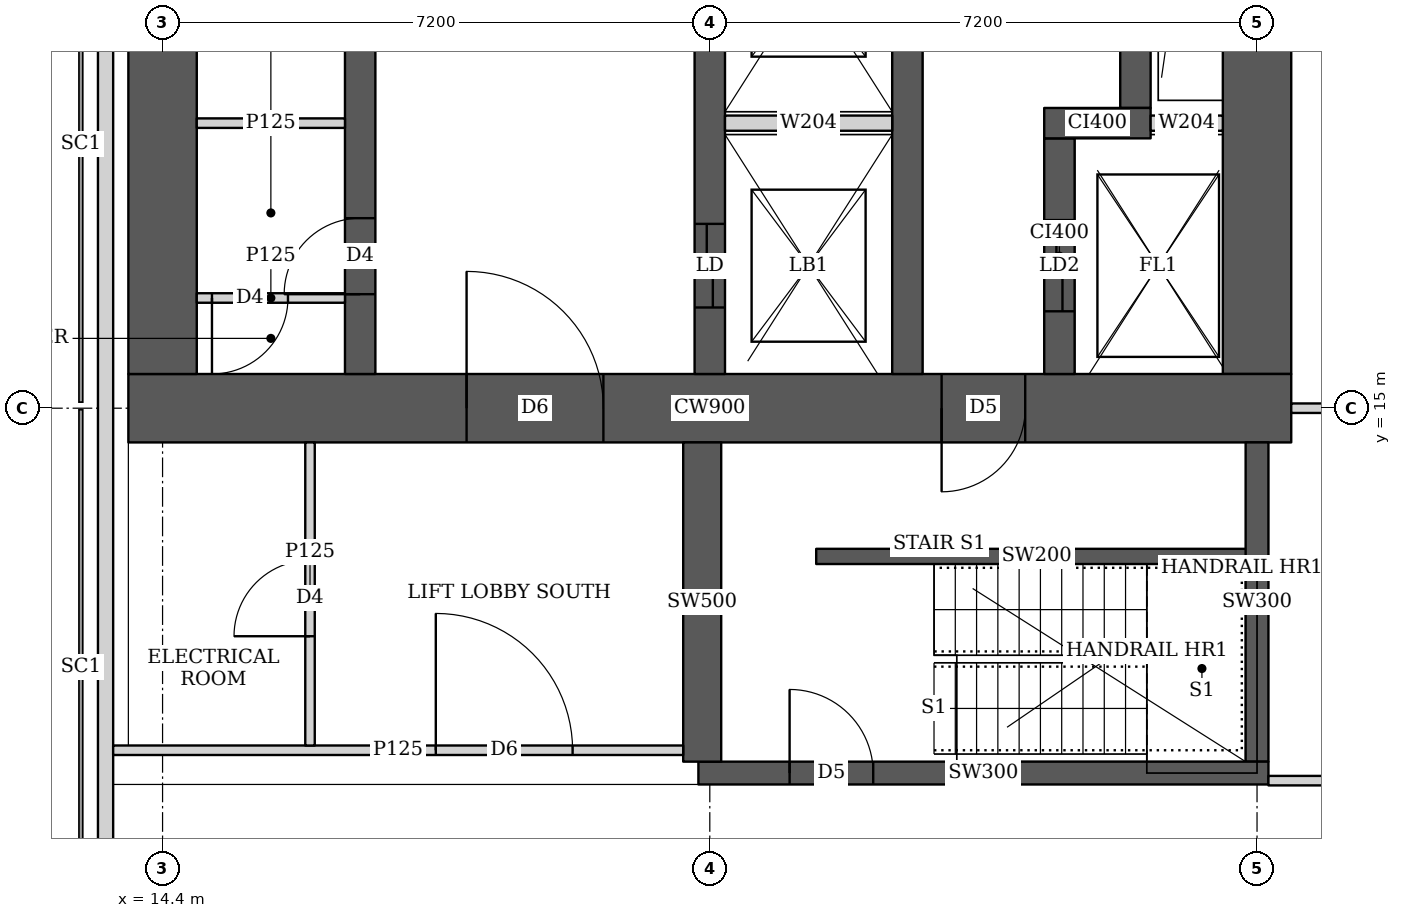
"""IFC4 building model, lengths in metres.
Left out: names, types, materials, properties, quantities, classifications, styles, units other than length and angle.
Written with IfcOpenShell. Run it as: python <this file> out.ifc"""

import sys

from ifc_helpers import new_model, si_unit, direction, frame, frame_2d, origin, place, context, subcontext, project, spatial, rectangle, extrude, element, fill, save


model = new_model("IFC4")
c1 = context("Model", 3, precision=1e-05, world=origin(), true_north=direction((0.0, 1.0)))
c2 = subcontext(c1, "Body", "Model", "MODEL_VIEW")
j1 = project(units=[si_unit("LENGTHUNIT", "METRE"), si_unit("PLANEANGLEUNIT", "RADIAN")], contexts=[c1])
p1 = place(None, origin())
s1 = spatial("IfcSite", under=j1, at=p1, CompositionType="ELEMENT")
p2 = place(p1, origin())
s2 = spatial("IfcBuilding", under=s1, at=p2, CompositionType="ELEMENT")
p3 = place(p2, frame((0.0, 0.0, 266.6)))
s3 = spatial("IfcBuildingStorey", under=s2, at=p3, CompositionType="ELEMENT", Elevation=266.6)
p4 = place(p3, frame((13.95, 15.0, 0.0), z_axis=(0.0, 0.0, 1.0), x_axis=(1.0, 0.0, 0.0)))
e1 = element("IfcWall", 1, at=p4, inside=s3, PredefinedType="SHEAR", context=c2, shape_type="SweptSolid", body=[
    extrude(rectangle(XDim=15.3, YDim=0.9, at=frame_2d((7.65, 0.0))), origin(), (0.0, 0.0, 1.0), 3.75),
])
p5 = place(p4, frame((4.45, 0.0, 0.0)))
e2 = element("IfcOpeningElement", 2, at=p5, cuts=e1, PredefinedType="OPENING", context=c2, shape_type="SweptSolid", body=[
    extrude(rectangle(XDim=1.8, YDim=2.1, at=frame_2d((0.9, 1.05))), frame((0.0, 0.46, 0.0), z_axis=(0.0, -1.0, 0.0), x_axis=(1.0, 0.0, 0.0)), (0.0, 0.0, 1.0), 0.92),
])
p6 = place(p4, frame((10.7, 0.0, 0.0)))
e3 = element("IfcOpeningElement", 3, at=p6, cuts=e1, PredefinedType="OPENING", context=c2, shape_type="SweptSolid", body=[
    extrude(rectangle(XDim=1.1, YDim=2.1, at=frame_2d((0.55, 1.05))), frame((0.0, 0.46, 0.0), z_axis=(0.0, -1.0, 0.0), x_axis=(1.0, 0.0, 0.0)), (0.0, 0.0, 1.0), 0.92),
])
for number, where, z_axis, x_axis in (
    (4, (14.4, 15.45, 0.0), (0.0, 0.0, 1.0), (0.0, 1.0, 0.0)),
    (5, (28.8, 15.45, 0.0), (0.0, 0.0, 1.0), (0.0, 1.0, 0.0)),
):
    element("IfcWall", number, at=place(p3, frame(where, z_axis=z_axis, x_axis=x_axis)), inside=s3, PredefinedType="SHEAR", context=c2, shape_type="SweptSolid", body=[
        extrude(rectangle(XDim=14.1, YDim=0.9, at=frame_2d((7.05, 0.0))), origin(), (0.0, 0.0, 1.0), 3.75),
    ])
p7 = place(p3, frame((17.0, 15.45, 0.0), z_axis=(0.0, 0.0, 1.0), x_axis=(0.0, 1.0, 0.0)))
e6 = element("IfcWall", 6, at=p7, inside=s3, PredefinedType="SHEAR", context=c2, shape_type="SweptSolid", body=[
    extrude(rectangle(XDim=14.1, YDim=0.4, at=frame_2d((7.05, 0.0))), origin(), (0.0, 0.0, 1.0), 3.75),
])
p8 = place(p7, frame((1.05, 0.0, 0.0)))
e7 = element("IfcOpeningElement", 7, at=p8, cuts=e6, PredefinedType="OPENING", context=c2, shape_type="SweptSolid", body=[
    extrude(rectangle(XDim=1.0, YDim=2.1, at=frame_2d((0.5, 1.05))), frame((0.0, 0.21, 0.0), z_axis=(0.0, -1.0, 0.0), x_axis=(1.0, 0.0, 0.0)), (0.0, 0.0, 1.0), 0.42),
])
p9 = place(p7, frame((4.675, 0.0, 0.0)))
e8 = element("IfcOpeningElement", 8, at=p9, cuts=e6, PredefinedType="OPENING", context=c2, shape_type="SweptSolid", body=[
    extrude(rectangle(XDim=1.0, YDim=2.1, at=frame_2d((0.5, 1.05))), frame((0.0, 0.21, 0.0), z_axis=(0.0, -1.0, 0.0), x_axis=(1.0, 0.0, 0.0)), (0.0, 0.0, 1.0), 0.42),
])
p10 = place(p7, frame((8.425, 0.0, 0.0)))
e9 = element("IfcOpeningElement", 9, at=p10, cuts=e6, PredefinedType="OPENING", context=c2, shape_type="SweptSolid", body=[
    extrude(rectangle(XDim=1.0, YDim=2.1, at=frame_2d((0.5, 1.05))), frame((0.0, 0.21, 0.0), z_axis=(0.0, -1.0, 0.0), x_axis=(1.0, 0.0, 0.0)), (0.0, 0.0, 1.0), 0.42),
])
p11 = place(p7, frame((12.175, 0.0, 0.0)))
e10 = element("IfcOpeningElement", 10, at=p11, cuts=e6, PredefinedType="OPENING", context=c2, shape_type="SweptSolid", body=[
    extrude(rectangle(XDim=1.0, YDim=2.1, at=frame_2d((0.5, 1.05))), frame((0.0, 0.21, 0.0), z_axis=(0.0, -1.0, 0.0), x_axis=(1.0, 0.0, 0.0)), (0.0, 0.0, 1.0), 0.42),
])
p12 = place(p3, frame((21.6, 15.45, 0.0), z_axis=(0.0, 0.0, 1.0), x_axis=(0.0, 1.0, 0.0)))
e11 = element("IfcWall", 11, at=p12, inside=s3, PredefinedType="SHEAR", context=c2, shape_type="SweptSolid", body=[
    extrude(rectangle(XDim=14.1, YDim=0.4, at=frame_2d((7.05, 0.0))), origin(), (0.0, 0.0, 1.0), 3.75),
])
p13 = place(p12, frame((0.875, 0.0, 0.0)))
e12 = element("IfcOpeningElement", 12, at=p13, cuts=e11, PredefinedType="OPENING", context=c2, shape_type="SweptSolid", body=[
    extrude(rectangle(XDim=1.1, YDim=2.1, at=frame_2d((0.55, 1.05))), frame((0.0, 0.21, 0.0), z_axis=(0.0, -1.0, 0.0), x_axis=(1.0, 0.0, 0.0)), (0.0, 0.0, 1.0), 0.42),
])
p14 = place(p12, frame((4.625, 0.0, 0.0)))
e13 = element("IfcOpeningElement", 13, at=p14, cuts=e11, PredefinedType="OPENING", context=c2, shape_type="SweptSolid", body=[
    extrude(rectangle(XDim=1.1, YDim=2.1, at=frame_2d((0.55, 1.05))), frame((0.0, 0.21, 0.0), z_axis=(0.0, -1.0, 0.0), x_axis=(1.0, 0.0, 0.0)), (0.0, 0.0, 1.0), 0.42),
])
p15 = place(p12, frame((8.375, 0.0, 0.0)))
e14 = element("IfcOpeningElement", 14, at=p15, cuts=e11, PredefinedType="OPENING", context=c2, shape_type="SweptSolid", body=[
    extrude(rectangle(XDim=1.1, YDim=2.1, at=frame_2d((0.55, 1.05))), frame((0.0, 0.21, 0.0), z_axis=(0.0, -1.0, 0.0), x_axis=(1.0, 0.0, 0.0)), (0.0, 0.0, 1.0), 0.42),
])
p16 = place(p12, frame((12.125, 0.0, 0.0)))
e15 = element("IfcOpeningElement", 15, at=p16, cuts=e11, PredefinedType="OPENING", context=c2, shape_type="SweptSolid", body=[
    extrude(rectangle(XDim=1.1, YDim=2.1, at=frame_2d((0.55, 1.05))), frame((0.0, 0.21, 0.0), z_axis=(0.0, -1.0, 0.0), x_axis=(1.0, 0.0, 0.0)), (0.0, 0.0, 1.0), 0.42),
])
p17 = place(p3, frame((24.2, 15.45, 0.0), z_axis=(0.0, 0.0, 1.0), x_axis=(0.0, 1.0, 0.0)))
e16 = element("IfcWall", 16, at=p17, inside=s3, PredefinedType="SHEAR", context=c2, shape_type="SweptSolid", body=[
    extrude(rectangle(XDim=14.1, YDim=0.4, at=frame_2d((7.05, 0.0))), origin(), (0.0, 0.0, 1.0), 3.75),
])
p18 = place(p3, frame((26.2, 15.45, 0.0), z_axis=(0.0, 0.0, 1.0), x_axis=(0.0, 1.0, 0.0)))
e17 = element("IfcWall", 17, at=p18, inside=s3, PredefinedType="SHEAR", context=c2, shape_type="SweptSolid", body=[
    extrude(rectangle(XDim=3.1, YDim=0.4, at=frame_2d((1.55, 0.0))), origin(), (0.0, 0.0, 1.0), 3.75),
])
p19 = place(p18, frame((0.825, 0.0, 0.0)))
e18 = element("IfcOpeningElement", 18, at=p19, cuts=e17, PredefinedType="OPENING", context=c2, shape_type="SweptSolid", body=[
    extrude(rectangle(XDim=1.2, YDim=2.1, at=frame_2d((0.6, 1.05))), frame((0.0, 0.21, 0.0), z_axis=(0.0, -1.0, 0.0), x_axis=(1.0, 0.0, 0.0)), (0.0, 0.0, 1.0), 0.42),
])
p20 = place(p3, frame((26.0, 18.75, 0.0), z_axis=(0.0, 0.0, 1.0), x_axis=(1.0, 0.0, 0.0)))
e19 = element("IfcWall", 19, at=p20, inside=s3, PredefinedType="SHEAR", context=c2, shape_type="SweptSolid", body=[
    extrude(rectangle(XDim=1.4, YDim=0.4, at=frame_2d((0.7, 0.0))), origin(), (0.0, 0.0, 1.0), 3.75),
])
p21 = place(p3, frame((27.2, 18.95, 0.0), z_axis=(0.0, 0.0, 1.0), x_axis=(0.0, 1.0, 0.0)))
e20 = element("IfcWall", 20, at=p21, inside=s3, PredefinedType="SHEAR", context=c2, shape_type="SweptSolid", body=[
    extrude(rectangle(XDim=7.1, YDim=0.4, at=frame_2d((3.55, 0.0))), origin(), (0.0, 0.0, 1.0), 3.75),
])
p22 = place(p3, frame((21.45, 10.2, 0.0), z_axis=(0.0, 0.0, 1.0), x_axis=(1.0, 0.0, 0.0)))
e21 = element("IfcWall", 21, at=p22, inside=s3, PredefinedType="SHEAR", context=c2, shape_type="SweptSolid", body=[
    extrude(rectangle(XDim=7.5, YDim=0.3, at=frame_2d((3.75, 0.0))), origin(), (0.0, 0.0, 1.0), 3.75),
])
p23 = place(p22, frame((1.2, 0.0, 0.0)))
e22 = element("IfcOpeningElement", 22, at=p23, cuts=e21, PredefinedType="OPENING", context=c2, shape_type="SweptSolid", body=[
    extrude(rectangle(XDim=1.1, YDim=2.1, at=frame_2d((0.55, 1.05))), frame((0.0, 0.16, 0.0), z_axis=(0.0, -1.0, 0.0), x_axis=(1.0, 0.0, 0.0)), (0.0, 0.0, 1.0), 0.32),
])
p24 = place(p3, frame((21.5, 10.35, 0.0), z_axis=(0.0, 0.0, 1.0), x_axis=(0.0, 1.0, 0.0)))
e23 = element("IfcWall", 23, at=p24, inside=s3, PredefinedType="SHEAR", context=c2, shape_type="SweptSolid", body=[
    extrude(rectangle(XDim=4.2, YDim=0.5, at=frame_2d((2.1, 0.0))), origin(), (0.0, 0.0, 1.0), 3.75),
])
p25 = place(p3, frame((28.8, 10.35, 0.0), z_axis=(0.0, 0.0, 1.0), x_axis=(0.0, 1.0, 0.0)))
e24 = element("IfcWall", 24, at=p25, inside=s3, PredefinedType="SHEAR", context=c2, shape_type="SweptSolid", body=[
    extrude(rectangle(XDim=4.2, YDim=0.3, at=frame_2d((2.1, 0.0))), origin(), (0.0, 0.0, 1.0), 3.75),
])
p26 = place(p3, frame((13.65, 43.037, 0.0), z_axis=(0.0, 0.0, 1.0), x_axis=(0.0, -1.0, 0.0)))
e25 = element("IfcWall", 25, at=p26, inside=s3, PredefinedType="SOLIDWALL", context=c2, shape_type="SweptSolid", body=[
    extrude(rectangle(XDim=35.374, YDim=0.2, at=frame_2d((17.687, 0.0))), origin(), (0.0, 0.0, 1.0), 3.5),
])
p27 = place(p26, frame((1.959, 0.0, 0.9)))
e26 = element("IfcOpeningElement", 26, at=p27, cuts=e25, PredefinedType="OPENING", context=c2, shape_type="SweptSolid", body=[
    extrude(rectangle(XDim=1.8, YDim=1.5, at=frame_2d((0.9, 0.75))), frame((0.0, 0.11, 0.0), z_axis=(0.0, -1.0, 0.0), x_axis=(1.0, 0.0, 0.0)), (0.0, 0.0, 1.0), 0.22),
])
p28 = place(p3, frame((13.75, 10.5, 0.0), z_axis=(0.0, 0.0, 1.0), x_axis=(1.0, 0.0, 0.0)))
e27 = element("IfcWall", 27, at=p28, inside=s3, PredefinedType="PARTITIONING", context=c2, shape_type="SweptSolid", body=[
    extrude(rectangle(XDim=7.5, YDim=0.125, at=frame_2d((3.75, 0.0))), origin(), (0.0, 0.0, 1.0), 3.5),
])
p29 = place(p28, frame((4.245, 0.0, 0.0)))
e28 = element("IfcOpeningElement", 28, at=p29, cuts=e27, PredefinedType="OPENING", context=c2, shape_type="SweptSolid", body=[
    extrude(rectangle(XDim=1.8, YDim=2.1, at=frame_2d((0.9, 1.05))), frame((0.0, 0.073, 0.0), z_axis=(0.0, -1.0, 0.0), x_axis=(1.0, 0.0, 0.0)), (0.0, 0.0, 1.0), 0.145),
])
p30 = place(p3, frame((16.34, 10.562, 0.0), z_axis=(0.0, 0.0, 1.0), x_axis=(0.0, 1.0, 0.0)))
e29 = element("IfcWall", 29, at=p30, inside=s3, PredefinedType="PARTITIONING", context=c2, shape_type="SweptSolid", body=[
    extrude(rectangle(XDim=3.988, YDim=0.125, at=frame_2d((1.994, 0.0))), origin(), (0.0, 0.0, 1.0), 3.5),
])
p31 = place(p30, frame((1.438, 0.0, 0.0)))
e30 = element("IfcOpeningElement", 30, at=p31, cuts=e29, PredefinedType="OPENING", context=c2, shape_type="SweptSolid", body=[
    extrude(rectangle(XDim=1.0, YDim=2.1, at=frame_2d((0.5, 1.05))), frame((0.0, 0.073, 0.0), z_axis=(0.0, -1.0, 0.0), x_axis=(1.0, 0.0, 0.0)), (0.0, 0.0, 1.0), 0.145),
])
p32 = place(p3, frame((28.95, 10.1, 0.0), z_axis=(0.0, 0.0, 1.0), x_axis=(1.0, 0.0, 0.0)))
e31 = element("IfcWall", 31, at=p32, inside=s3, PredefinedType="PARTITIONING", context=c2, shape_type="SweptSolid", body=[
    extrude(rectangle(XDim=9.188, YDim=0.125, at=frame_2d((4.594, 0.0))), origin(), (0.0, 0.0, 1.0), 3.5),
])
p33 = place(p3, frame((29.25, 15.0, 0.0), z_axis=(0.0, 0.0, 1.0), x_axis=(1.0, 0.0, 0.0)))
e32 = element("IfcWall", 32, at=p33, inside=s3, PredefinedType="PARTITIONING", context=c2, shape_type="SweptSolid", body=[
    extrude(rectangle(XDim=6.049, YDim=0.125, at=frame_2d((3.024, 0.0))), origin(), (0.0, 0.0, 1.0), 3.5),
])
p34 = place(p3, frame((14.85, 16.45, 0.0), z_axis=(0.0, 0.0, 1.0), x_axis=(1.0, 0.0, 0.0)))
e33 = element("IfcWall", 33, at=p34, inside=s3, PredefinedType="PARTITIONING", context=c2, shape_type="SweptSolid", body=[
    extrude(rectangle(XDim=1.95, YDim=0.125, at=frame_2d((0.975, 0.0))), origin(), (0.0, 0.0, 1.0), 3.5),
])
p35 = place(p34, frame((0.2, 0.0, 0.0)))
e34 = element("IfcOpeningElement", 34, at=p35, cuts=e33, PredefinedType="OPENING", context=c2, shape_type="SweptSolid", body=[
    extrude(rectangle(XDim=1.0, YDim=2.1, at=frame_2d((0.5, 1.05))), frame((0.0, 0.073, 0.0), z_axis=(0.0, -1.0, 0.0), x_axis=(1.0, 0.0, 0.0)), (0.0, 0.0, 1.0), 0.145),
])
p36 = place(p3, frame((14.85, 18.75, 0.0), z_axis=(0.0, 0.0, 1.0), x_axis=(1.0, 0.0, 0.0)))
e35 = element("IfcWall", 35, at=p36, inside=s3, PredefinedType="PARTITIONING", context=c2, shape_type="SweptSolid", body=[
    extrude(rectangle(XDim=1.95, YDim=0.125, at=frame_2d((0.975, 0.0))), origin(), (0.0, 0.0, 1.0), 3.5),
])
p37 = place(p3, frame((23.0, 13.05, 0.0), z_axis=(0.0, 0.0, 1.0), x_axis=(1.0, 0.0, 0.0)))
e36 = element("IfcWall", 36, at=p37, inside=s3, PredefinedType="SHEAR", context=c2, shape_type="SweptSolid", body=[
    extrude(rectangle(XDim=5.8, YDim=0.2, at=frame_2d((2.9, 0.0))), origin(), (0.0, 0.0, 1.0), 3.75),
])
p38 = place(p3, frame((21.8, 18.75, 0.0), z_axis=(0.0, 0.0, 1.0), x_axis=(1.0, 0.0, 0.0)))
e37 = element("IfcWall", 37, at=p38, inside=s3, PredefinedType="SOLIDWALL", context=c2, shape_type="SweptSolid", body=[
    extrude(rectangle(XDim=2.2, YDim=0.2, at=frame_2d((1.1, 0.0))), origin(), (0.0, 0.0, 1.0), 3.5),
])
p39 = place(p3, frame((27.4, 18.75, 0.0), z_axis=(0.0, 0.0, 1.0), x_axis=(1.0, 0.0, 0.0)))
e38 = element("IfcWall", 38, at=p39, inside=s3, PredefinedType="SOLIDWALL", context=c2, shape_type="SweptSolid", body=[
    extrude(rectangle(XDim=0.95, YDim=0.2, at=frame_2d((0.475, 0.0))), origin(), (0.0, 0.0, 1.0), 3.5),
])
p40 = place(p31, origin())
e39 = element("IfcDoor", 39, at=p40, inside=s3, OperationType="SINGLE_SWING_LEFT", PredefinedType="DOOR", context=c2, shape_type="SweptSolid", body=[
    extrude(rectangle(XDim=1.0, YDim=2.1, at=frame_2d((0.5, 1.05))), frame((0.0, 0.025, 0.0), z_axis=(0.0, -1.0, 0.0), x_axis=(1.0, 0.0, 0.0)), (0.0, 0.0, 1.0), 0.05),
])
fill(e30, e39)
p41 = place(p29, origin())
e40 = element("IfcDoor", 40, at=p41, inside=s3, OperationType="DOUBLE_DOOR_SINGLE_SWING", PredefinedType="DOOR", context=c2, shape_type="SweptSolid", body=[
    extrude(rectangle(XDim=1.8, YDim=2.1, at=frame_2d((0.9, 1.05))), frame((0.0, 0.025, 0.0), z_axis=(0.0, -1.0, 0.0), x_axis=(1.0, 0.0, 0.0)), (0.0, 0.0, 1.0), 0.05),
])
fill(e28, e40)
p42 = place(p35, origin())
e41 = element("IfcDoor", 41, at=p42, inside=s3, OperationType="SINGLE_SWING_RIGHT", PredefinedType="DOOR", context=c2, shape_type="SweptSolid", body=[
    extrude(rectangle(XDim=1.0, YDim=2.1, at=frame_2d((0.5, 1.05))), frame((0.0, 0.025, 0.0), z_axis=(0.0, -1.0, 0.0), x_axis=(1.0, 0.0, 0.0)), (0.0, 0.0, 1.0), 0.05),
])
fill(e34, e41)
p43 = place(p8, origin())
e42 = element("IfcDoor", 42, at=p43, inside=s3, OperationType="SINGLE_SWING_LEFT", PredefinedType="DOOR", context=c2, shape_type="SweptSolid", body=[
    extrude(rectangle(XDim=1.0, YDim=2.1, at=frame_2d((0.5, 1.05))), frame((0.0, 0.025, 0.0), z_axis=(0.0, -1.0, 0.0), x_axis=(1.0, 0.0, 0.0)), (0.0, 0.0, 1.0), 0.05),
])
fill(e7, e42)
p44 = place(p5, origin())
e43 = element("IfcDoor", 43, at=p44, inside=s3, OperationType="DOUBLE_DOOR_SINGLE_SWING", PredefinedType="DOOR", context=c2, shape_type="SweptSolid", body=[
    extrude(rectangle(XDim=1.8, YDim=2.1, at=frame_2d((0.9, 1.05))), frame((0.0, 0.025, 0.0), z_axis=(0.0, -1.0, 0.0), x_axis=(1.0, 0.0, 0.0)), (0.0, 0.0, 1.0), 0.05),
])
fill(e2, e43)
p45 = place(p6, origin())
e44 = element("IfcDoor", 44, at=p45, inside=s3, OperationType="SINGLE_SWING_RIGHT", PredefinedType="DOOR", context=c2, shape_type="SweptSolid", body=[
    extrude(rectangle(XDim=1.1, YDim=2.1, at=frame_2d((0.55, 1.05))), frame((0.0, 0.025, 0.0), z_axis=(0.0, -1.0, 0.0), x_axis=(1.0, 0.0, 0.0)), (0.0, 0.0, 1.0), 0.05),
])
fill(e3, e44)
p46 = place(p19, origin())
e45 = element("IfcDoor", 45, at=p46, inside=s3, OperationType="DOUBLE_DOOR_SLIDING", PredefinedType="DOOR", context=c2, shape_type="SweptSolid", body=[
    extrude(rectangle(XDim=1.2, YDim=2.1, at=frame_2d((0.6, 1.05))), frame((0.0, 0.025, 0.0), z_axis=(0.0, -1.0, 0.0), x_axis=(1.0, 0.0, 0.0)), (0.0, 0.0, 1.0), 0.05),
])
fill(e18, e45)
p47 = place(p13, origin())
e46 = element("IfcDoor", 46, at=p47, inside=s3, OperationType="DOUBLE_DOOR_SLIDING", PredefinedType="DOOR", context=c2, shape_type="SweptSolid", body=[
    extrude(rectangle(XDim=1.1, YDim=2.1, at=frame_2d((0.55, 1.05))), frame((0.0, 0.025, 0.0), z_axis=(0.0, -1.0, 0.0), x_axis=(1.0, 0.0, 0.0)), (0.0, 0.0, 1.0), 0.05),
])
fill(e12, e46)
p48 = place(p23, origin())
e47 = element("IfcDoor", 47, at=p48, inside=s3, OperationType="SINGLE_SWING_LEFT", PredefinedType="DOOR", context=c2, shape_type="SweptSolid", body=[
    extrude(rectangle(XDim=1.1, YDim=2.1, at=frame_2d((0.55, 1.05))), frame((0.0, 0.025, 0.0), z_axis=(0.0, -1.0, 0.0), x_axis=(1.0, 0.0, 0.0)), (0.0, 0.0, 1.0), 0.05),
])
fill(e22, e47)
save(model, sys.argv[1])
